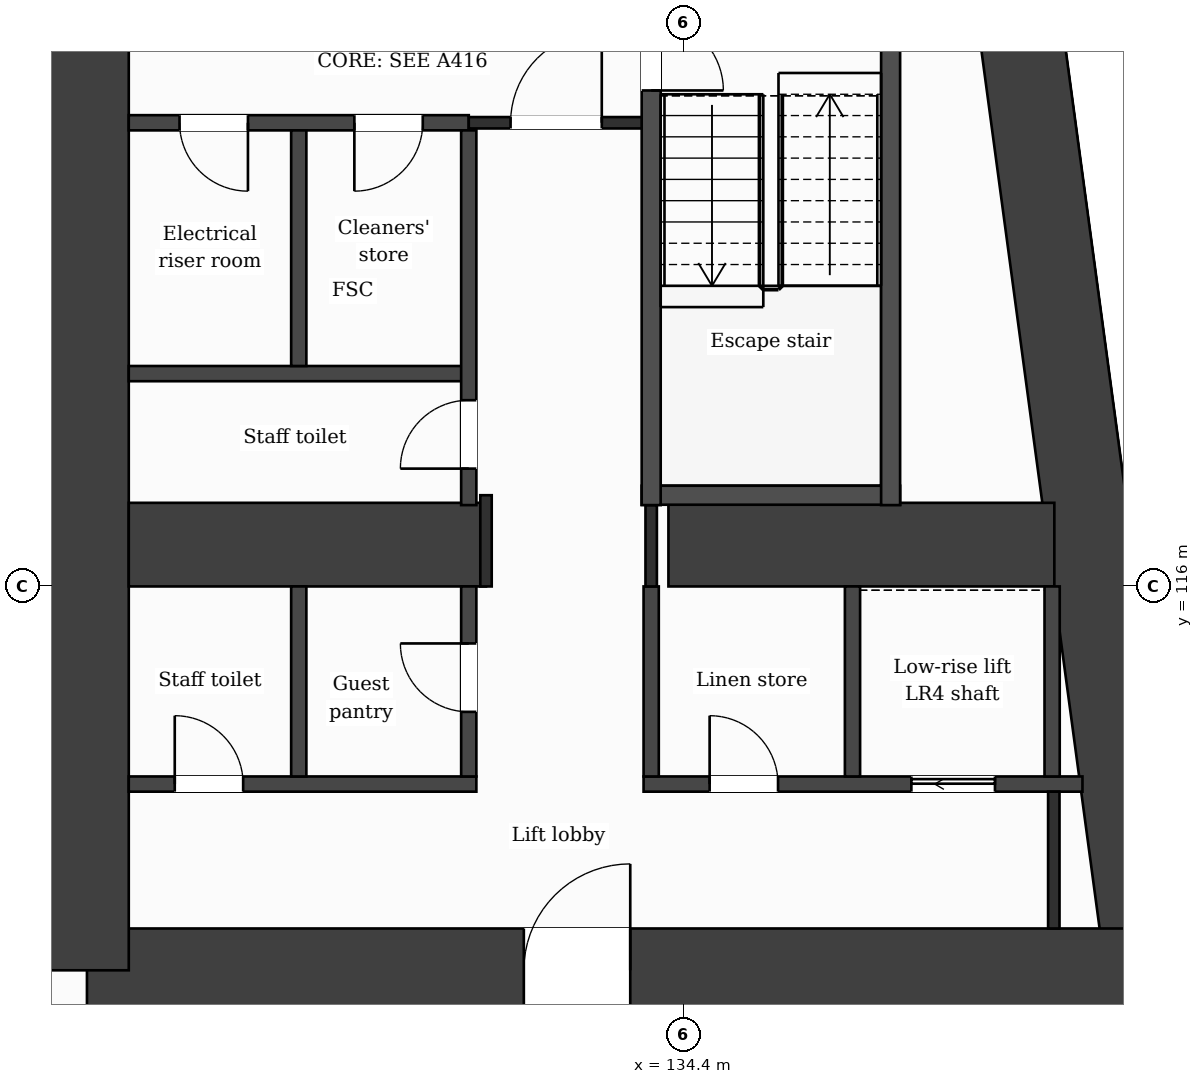
"""IFC4 building model, lengths in metres.
Left out: names, types, materials, properties, quantities, classifications, styles, units other than length and angle.
Written with IfcOpenShell. Run it as: python <this file> out.ifc"""

import sys

from ifc_helpers import new_model, si_unit, direction, frame, frame_2d, origin, place, context, subcontext, project, spatial, rectangle, extrude, element, fill, save


model = new_model("IFC4")
c1 = context("Model", 3, precision=1e-05, world=origin(), true_north=direction((0.0, 1.0)))
c2 = subcontext(c1, "Body", "Model", "MODEL_VIEW")
j1 = project(units=[si_unit("LENGTHUNIT", "METRE"), si_unit("PLANEANGLEUNIT", "RADIAN")], contexts=[c1])
p1 = place(None, origin())
s1 = spatial("IfcSite", under=j1, at=p1, CompositionType="ELEMENT")
p2 = place(p1, origin())
s2 = spatial("IfcBuilding", under=s1, at=p2, CompositionType="ELEMENT")
p3 = place(p2, frame((0.0, 0.0, 70.5)))
s3 = spatial("IfcBuildingStorey", under=s2, at=p3, CompositionType="ELEMENT", Elevation=70.5)
p4 = place(p3, frame((137.688, 131.85, 0.0), z_axis=(0.0, 0.0, 1.0), x_axis=(0.133411793472, -0.991060691059, 0.0)))
e1 = element("IfcWall", 1, at=p4, inside=s3, PredefinedType="SHEAR", context=c2, shape_type="SweptSolid", body=[
    extrude(rectangle(XDim=21.089, YDim=1.1, at=frame_2d((10.544, 0.0))), origin(), (0.0, 0.0, 1.0), 3.5),
])
p5 = place(p3, frame((140.502, 110.95, 0.0), z_axis=(0.0, 0.0, 1.0), x_axis=(-1.0, 0.0, 0.0)))
e2 = element("IfcWall", 2, at=p5, inside=s3, PredefinedType="SHEAR", context=c2, shape_type="SweptSolid", body=[
    extrude(rectangle(XDim=13.952, YDim=1.1, at=frame_2d((6.976, 0.0))), origin(), (0.0, 0.0, 1.0), 3.5),
])
p6 = place(p5, frame((6.804, 0.0, 0.0)))
e3 = element("IfcOpeningElement", 3, at=p6, cuts=e2, PredefinedType="OPENING", context=c2, shape_type="SweptSolid", body=[
    extrude(rectangle(XDim=1.4, YDim=2.1, at=frame_2d((0.7, 1.05))), frame((0.0, 0.56, 0.0), z_axis=(0.0, -1.0, 0.0), x_axis=(1.0, 0.0, 0.0)), (0.0, 0.0, 1.0), 1.12),
])
p7 = place(p3, frame((126.55, 110.95, 0.0), z_axis=(0.0, 0.0, 1.0), x_axis=(0.0, 1.0, 0.0)))
e4 = element("IfcWall", 4, at=p7, inside=s3, PredefinedType="SHEAR", context=c2, shape_type="SweptSolid", body=[
    extrude(rectangle(XDim=20.9, YDim=1.1, at=frame_2d((10.45, 0.0))), origin(), (0.0, 0.0, 1.0), 3.5),
])
p8 = place(p3, frame((127.1, 116.55, 0.0), z_axis=(0.0, 0.0, 1.0), x_axis=(1.0, 0.0, 0.0)))
e5 = element("IfcWall", 5, at=p8, inside=s3, PredefinedType="SHEAR", context=c2, shape_type="SweptSolid", body=[
    extrude(rectangle(XDim=4.7, YDim=1.1, at=frame_2d((2.35, 0.0))), origin(), (0.0, 0.0, 1.0), 3.5),
])
p9 = place(p3, frame((134.2, 116.55, 0.0), z_axis=(0.0, 0.0, 1.0), x_axis=(1.0, 0.0, 0.0)))
e6 = element("IfcWall", 6, at=p9, inside=s3, PredefinedType="SHEAR", context=c2, shape_type="SweptSolid", body=[
    extrude(rectangle(XDim=5.077, YDim=1.1, at=frame_2d((2.539, 0.0))), origin(), (0.0, 0.0, 1.0), 3.5),
])
p10 = place(p3, frame((127.1, 113.4, 0.0), z_axis=(0.0, 0.0, 1.0), x_axis=(1.0, 0.0, 0.0)))
e7 = element("IfcWall", 7, at=p10, inside=s3, PredefinedType="PARTITIONING", context=c2, shape_type="SweptSolid", body=[
    extrude(rectangle(XDim=4.573, YDim=0.2, at=frame_2d((2.287, 0.0))), origin(), (0.0, 0.0, 1.0), 3.18),
])
p11 = place(p10, frame((0.605, 0.0, 0.0)))
e8 = element("IfcOpeningElement", 8, at=p11, cuts=e7, PredefinedType="OPENING", context=c2, shape_type="SweptSolid", body=[
    extrude(rectangle(XDim=0.9, YDim=2.1, at=frame_2d((0.45, 1.05))), frame((0.0, 0.11, 0.0), z_axis=(0.0, -1.0, 0.0), x_axis=(1.0, 0.0, 0.0)), (0.0, 0.0, 1.0), 0.22),
])
p12 = place(p3, frame((133.873, 113.4, 0.0), z_axis=(0.0, 0.0, 1.0), x_axis=(1.0, 0.0, 0.0)))
e9 = element("IfcWall", 9, at=p12, inside=s3, PredefinedType="PARTITIONING", context=c2, shape_type="SweptSolid", body=[
    extrude(rectangle(XDim=5.774, YDim=0.2, at=frame_2d((2.887, 0.0))), origin(), (0.0, 0.0, 1.0), 3.18),
])
p13 = place(p12, frame((3.523, 0.0, 0.0)))
e10 = element("IfcOpeningElement", 10, at=p13, cuts=e9, PredefinedType="OPENING", context=c2, shape_type="SweptSolid", body=[
    extrude(rectangle(XDim=1.1, YDim=2.1, at=frame_2d((0.55, 1.05))), frame((0.0, 0.11, 0.0), z_axis=(0.0, -1.0, 0.0), x_axis=(1.0, 0.0, 0.0)), (0.0, 0.0, 1.0), 0.22),
])
p14 = place(p12, frame((0.869, 0.0, 0.0)))
e11 = element("IfcOpeningElement", 11, at=p14, cuts=e9, PredefinedType="OPENING", context=c2, shape_type="SweptSolid", body=[
    extrude(rectangle(XDim=0.9, YDim=2.1, at=frame_2d((0.45, 1.05))), frame((0.0, 0.11, 0.0), z_axis=(0.0, -1.0, 0.0), x_axis=(1.0, 0.0, 0.0)), (0.0, 0.0, 1.0), 0.22),
])
p15 = place(p3, frame((133.848, 117.2, 0.0), z_axis=(0.0, 0.0, 1.0), x_axis=(1.0, 0.0, 0.0)))
e12 = element("IfcWall", 12, at=p15, inside=s3, PredefinedType="PARTITIONING", context=c2, shape_type="SweptSolid", body=[
    extrude(rectangle(XDim=3.4, YDim=0.25, at=frame_2d((1.7, 0.0))), origin(), (0.0, 0.0, 1.0), 3.18),
])
p16 = place(p3, frame((127.1, 118.8, 0.0), z_axis=(0.0, 0.0, 1.0), x_axis=(1.0, 0.0, 0.0)))
e13 = element("IfcWall", 13, at=p16, inside=s3, PredefinedType="PARTITIONING", context=c2, shape_type="SweptSolid", body=[
    extrude(rectangle(XDim=4.473, YDim=0.2, at=frame_2d((2.236, 0.0))), origin(), (0.0, 0.0, 1.0), 3.18),
])
p17 = place(p3, frame((127.1, 122.1, 0.0), z_axis=(0.0, 0.0, 1.0), x_axis=(1.0, 0.0, 0.0)))
e14 = element("IfcWall", 14, at=p17, inside=s3, PredefinedType="PARTITIONING", context=c2, shape_type="SweptSolid", body=[
    extrude(rectangle(XDim=4.473, YDim=0.2, at=frame_2d((2.236, 0.0))), origin(), (0.0, 0.0, 1.0), 3.18),
])
p18 = place(p17, frame((2.968, 0.0, 0.0)))
e15 = element("IfcOpeningElement", 15, at=p18, cuts=e14, PredefinedType="OPENING", context=c2, shape_type="SweptSolid", body=[
    extrude(rectangle(XDim=0.9, YDim=2.1, at=frame_2d((0.45, 1.05))), frame((0.0, 0.11, 0.0), z_axis=(0.0, -1.0, 0.0), x_axis=(1.0, 0.0, 0.0)), (0.0, 0.0, 1.0), 0.22),
])
p19 = place(p17, frame((0.668, 0.0, 0.0)))
e16 = element("IfcOpeningElement", 16, at=p19, cuts=e14, PredefinedType="OPENING", context=c2, shape_type="SweptSolid", body=[
    extrude(rectangle(XDim=0.9, YDim=2.1, at=frame_2d((0.45, 1.05))), frame((0.0, 0.11, 0.0), z_axis=(0.0, -1.0, 0.0), x_axis=(1.0, 0.0, 0.0)), (0.0, 0.0, 1.0), 0.22),
])
p20 = place(p3, frame((131.573, 122.1, 0.0), z_axis=(0.0, 0.0, 1.0), x_axis=(1.0, 0.0, 0.0)))
e17 = element("IfcWall", 17, at=p20, inside=s3, PredefinedType="PARTITIONING", context=c2, shape_type="SweptSolid", body=[
    extrude(rectangle(XDim=2.4, YDim=0.15, at=frame_2d((1.2, 0.0))), origin(), (0.0, 0.0, 1.0), 3.18),
])
p21 = place(p20, frame((0.55, 0.0, 0.0)))
e18 = element("IfcOpeningElement", 18, at=p21, cuts=e17, PredefinedType="OPENING", context=c2, shape_type="SweptSolid", body=[
    extrude(rectangle(XDim=1.2, YDim=2.1, at=frame_2d((0.6, 1.05))), frame((0.0, 0.085, 0.0), z_axis=(0.0, -1.0, 0.0), x_axis=(1.0, 0.0, 0.0)), (0.0, 0.0, 1.0), 0.17),
])
p22 = place(p3, frame((129.336, 113.5, 0.0), z_axis=(0.0, 0.0, 1.0), x_axis=(0.0, 1.0, 0.0)))
e19 = element("IfcWall", 19, at=p22, inside=s3, PredefinedType="PARTITIONING", context=c2, shape_type="SweptSolid", body=[
    extrude(rectangle(XDim=2.5, YDim=0.2, at=frame_2d((1.25, 0.0))), origin(), (0.0, 0.0, 1.0), 3.18),
])
p23 = place(p3, frame((129.336, 118.9, 0.0), z_axis=(0.0, 0.0, 1.0), x_axis=(0.0, 1.0, 0.0)))
e20 = element("IfcWall", 20, at=p23, inside=s3, PredefinedType="PARTITIONING", context=c2, shape_type="SweptSolid", body=[
    extrude(rectangle(XDim=3.1, YDim=0.2, at=frame_2d((1.55, 0.0))), origin(), (0.0, 0.0, 1.0), 3.18),
])
p24 = place(p3, frame((131.573, 113.5, 0.0), z_axis=(0.0, 0.0, 1.0), x_axis=(0.0, 1.0, 0.0)))
e21 = element("IfcWall", 21, at=p24, inside=s3, PredefinedType="PARTITIONING", context=c2, shape_type="SweptSolid", body=[
    extrude(rectangle(XDim=2.5, YDim=0.2, at=frame_2d((1.25, 0.0))), origin(), (0.0, 0.0, 1.0), 3.18),
])
p25 = place(p24, frame((0.85, 0.0, 0.0)))
e22 = element("IfcOpeningElement", 22, at=p25, cuts=e21, PredefinedType="OPENING", context=c2, shape_type="SweptSolid", body=[
    extrude(rectangle(XDim=0.9, YDim=2.1, at=frame_2d((0.45, 1.05))), frame((0.0, 0.11, 0.0), z_axis=(0.0, -1.0, 0.0), x_axis=(1.0, 0.0, 0.0)), (0.0, 0.0, 1.0), 0.22),
])
p26 = place(p3, frame((131.573, 117.07, 0.0), z_axis=(0.0, 0.0, 1.0), x_axis=(0.0, 1.0, 0.0)))
e23 = element("IfcWall", 23, at=p26, inside=s3, PredefinedType="PARTITIONING", context=c2, shape_type="SweptSolid", body=[
    extrude(rectangle(XDim=4.93, YDim=0.2, at=frame_2d((2.465, 0.0))), origin(), (0.0, 0.0, 1.0), 3.18),
])
p27 = place(p26, frame((0.48, 0.0, 0.0)))
e24 = element("IfcOpeningElement", 24, at=p27, cuts=e23, PredefinedType="OPENING", context=c2, shape_type="SweptSolid", body=[
    extrude(rectangle(XDim=0.9, YDim=2.1, at=frame_2d((0.45, 1.05))), frame((0.0, 0.11, 0.0), z_axis=(0.0, -1.0, 0.0), x_axis=(1.0, 0.0, 0.0)), (0.0, 0.0, 1.0), 0.22),
])
p28 = place(p3, frame((131.8, 116.0, 0.0), z_axis=(0.0, 0.0, 1.0), x_axis=(0.0, 1.0, 0.0)))
e25 = element("IfcWall", 25, at=p28, inside=s3, PredefinedType="PARTITIONING", context=c2, shape_type="SweptSolid", body=[
    extrude(rectangle(XDim=1.2, YDim=0.15, at=frame_2d((0.6, 0.0))), origin(), (0.0, 0.0, 1.0), 3.18),
])
p29 = place(p3, frame((133.973, 113.5, 0.0), z_axis=(0.0, 0.0, 1.0), x_axis=(0.0, 1.0, 0.0)))
e26 = element("IfcWall", 26, at=p29, inside=s3, PredefinedType="PARTITIONING", context=c2, shape_type="SweptSolid", body=[
    extrude(rectangle(XDim=2.5, YDim=0.2, at=frame_2d((1.25, 0.0))), origin(), (0.0, 0.0, 1.0), 3.18),
])
p30 = place(p3, frame((133.973, 116.0, 0.0), z_axis=(0.0, 0.0, 1.0), x_axis=(0.0, 1.0, 0.0)))
e27 = element("IfcWall", 27, at=p30, inside=s3, PredefinedType="PARTITIONING", context=c2, shape_type="SweptSolid", body=[
    extrude(rectangle(XDim=1.07, YDim=0.15, at=frame_2d((0.535, 0.0))), origin(), (0.0, 0.0, 1.0), 3.18),
])
p31 = place(p3, frame((133.973, 117.07, 0.0), z_axis=(0.0, 0.0, 1.0), x_axis=(0.0, 1.0, 0.0)))
e28 = element("IfcWall", 28, at=p31, inside=s3, PredefinedType="PARTITIONING", context=c2, shape_type="SweptSolid", body=[
    extrude(rectangle(XDim=6.755, YDim=0.25, at=frame_2d((3.377, 0.0))), origin(), (0.0, 0.0, 1.0), 3.18),
])
p32 = place(p31, frame((5.455, 0.0, 0.0)))
e29 = element("IfcOpeningElement", 29, at=p32, cuts=e28, PredefinedType="OPENING", context=c2, shape_type="SweptSolid", body=[
    extrude(rectangle(XDim=0.95, YDim=2.1, at=frame_2d((0.475, 1.05))), frame((0.0, 0.135, 0.0), z_axis=(0.0, -1.0, 0.0), x_axis=(1.0, 0.0, 0.0)), (0.0, 0.0, 1.0), 0.27),
])
p33 = place(p3, frame((136.622, 113.5, 0.0), z_axis=(0.0, 0.0, 1.0), x_axis=(0.0, 1.0, 0.0)))
e30 = element("IfcWall", 30, at=p33, inside=s3, PredefinedType="PARTITIONING", context=c2, shape_type="SweptSolid", body=[
    extrude(rectangle(XDim=2.5, YDim=0.2, at=frame_2d((1.25, 0.0))), origin(), (0.0, 0.0, 1.0), 3.18),
])
p34 = place(p3, frame((137.123, 117.07, 0.0), z_axis=(0.0, 0.0, 1.0), x_axis=(0.0, 1.0, 0.0)))
e31 = element("IfcWall", 31, at=p34, inside=s3, PredefinedType="PARTITIONING", context=c2, shape_type="SweptSolid", body=[
    extrude(rectangle(XDim=6.755, YDim=0.25, at=frame_2d((3.377, 0.0))), origin(), (0.0, 0.0, 1.0), 3.18),
])
p35 = place(p3, frame((139.248, 113.5, 0.0), z_axis=(0.0, 0.0, 1.0), x_axis=(0.0, 1.0, 0.0)))
e32 = element("IfcWall", 32, at=p35, inside=s3, PredefinedType="PARTITIONING", context=c2, shape_type="SweptSolid", body=[
    extrude(rectangle(XDim=2.5, YDim=0.2, at=frame_2d((1.25, 0.0))), origin(), (0.0, 0.0, 1.0), 3.18),
])
p36 = place(p3, frame((139.27, 111.5, 0.0), z_axis=(0.0, 0.0, 1.0), x_axis=(0.0, 1.0, 0.0)))
e33 = element("IfcWall", 33, at=p36, inside=s3, PredefinedType="PARTITIONING", context=c2, shape_type="SweptSolid", body=[
    extrude(rectangle(XDim=1.8, YDim=0.15, at=frame_2d((0.9, 0.0))), origin(), (0.0, 0.0, 1.0), 3.18),
])
p37 = place(p21, origin())
e34 = element("IfcDoor", 34, at=p37, inside=s3, OperationType="SINGLE_SWING_RIGHT", PredefinedType="DOOR", context=c2, shape_type="SweptSolid", body=[
    extrude(rectangle(XDim=1.2, YDim=2.1, at=frame_2d((0.6, 1.05))), frame((0.0, 0.025, 0.0), z_axis=(0.0, -1.0, 0.0), x_axis=(1.0, 0.0, 0.0)), (0.0, 0.0, 1.0), 0.05),
])
fill(e18, e34)
p38 = place(p18, origin())
e35 = element("IfcDoor", 35, at=p38, inside=s3, OperationType="SINGLE_SWING_LEFT", PredefinedType="DOOR", context=c2, shape_type="SweptSolid", body=[
    extrude(rectangle(XDim=0.9, YDim=2.1, at=frame_2d((0.45, 1.05))), frame((0.0, 0.025, 0.0), z_axis=(0.0, -1.0, 0.0), x_axis=(1.0, 0.0, 0.0)), (0.0, 0.0, 1.0), 0.05),
])
fill(e15, e35)
p39 = place(p19, origin())
e36 = element("IfcDoor", 36, at=p39, inside=s3, OperationType="SINGLE_SWING_RIGHT", PredefinedType="DOOR", context=c2, shape_type="SweptSolid", body=[
    extrude(rectangle(XDim=0.9, YDim=2.1, at=frame_2d((0.45, 1.05))), frame((0.0, 0.025, 0.0), z_axis=(0.0, -1.0, 0.0), x_axis=(1.0, 0.0, 0.0)), (0.0, 0.0, 1.0), 0.05),
])
fill(e16, e36)
p40 = place(p32, origin())
e37 = element("IfcDoor", 37, at=p40, inside=s3, OperationType="SINGLE_SWING_LEFT", PredefinedType="DOOR", context=c2, shape_type="SweptSolid", body=[
    extrude(rectangle(XDim=0.95, YDim=2.1, at=frame_2d((0.475, 1.05))), frame((0.0, 0.025, 0.0), z_axis=(0.0, -1.0, 0.0), x_axis=(1.0, 0.0, 0.0)), (0.0, 0.0, 1.0), 0.05),
])
fill(e29, e37)
p41 = place(p27, origin())
e38 = element("IfcDoor", 38, at=p41, inside=s3, OperationType="SINGLE_SWING_LEFT", PredefinedType="DOOR", context=c2, shape_type="SweptSolid", body=[
    extrude(rectangle(XDim=0.9, YDim=2.1, at=frame_2d((0.45, 1.05))), frame((0.0, 0.025, 0.0), z_axis=(0.0, -1.0, 0.0), x_axis=(1.0, 0.0, 0.0)), (0.0, 0.0, 1.0), 0.05),
])
fill(e24, e38)
p42 = place(p13, origin())
e39 = element("IfcDoor", 39, at=p42, inside=s3, OperationType="SLIDING_TO_LEFT", PredefinedType="DOOR", context=c2, shape_type="SweptSolid", body=[
    extrude(rectangle(XDim=1.1, YDim=2.1, at=frame_2d((0.55, 1.05))), frame((0.0, 0.025, 0.0), z_axis=(0.0, -1.0, 0.0), x_axis=(1.0, 0.0, 0.0)), (0.0, 0.0, 1.0), 0.05),
])
fill(e10, e39)
p43 = place(p14, origin())
e40 = element("IfcDoor", 40, at=p43, inside=s3, OperationType="SINGLE_SWING_LEFT", PredefinedType="DOOR", context=c2, shape_type="SweptSolid", body=[
    extrude(rectangle(XDim=0.9, YDim=2.1, at=frame_2d((0.45, 1.05))), frame((0.0, 0.025, 0.0), z_axis=(0.0, -1.0, 0.0), x_axis=(1.0, 0.0, 0.0)), (0.0, 0.0, 1.0), 0.05),
])
fill(e11, e40)
p44 = place(p25, origin())
e41 = element("IfcDoor", 41, at=p44, inside=s3, OperationType="SINGLE_SWING_RIGHT", PredefinedType="DOOR", context=c2, shape_type="SweptSolid", body=[
    extrude(rectangle(XDim=0.9, YDim=2.1, at=frame_2d((0.45, 1.05))), frame((0.0, 0.025, 0.0), z_axis=(0.0, -1.0, 0.0), x_axis=(1.0, 0.0, 0.0)), (0.0, 0.0, 1.0), 0.05),
])
fill(e22, e41)
p45 = place(p11, origin())
e42 = element("IfcDoor", 42, at=p45, inside=s3, OperationType="SINGLE_SWING_LEFT", PredefinedType="DOOR", context=c2, shape_type="SweptSolid", body=[
    extrude(rectangle(XDim=0.9, YDim=2.1, at=frame_2d((0.45, 1.05))), frame((0.0, 0.025, 0.0), z_axis=(0.0, -1.0, 0.0), x_axis=(1.0, 0.0, 0.0)), (0.0, 0.0, 1.0), 0.05),
])
fill(e8, e42)
p46 = place(p6, origin())
e43 = element("IfcDoor", 43, at=p46, inside=s3, OperationType="SINGLE_SWING_LEFT", PredefinedType="DOOR", context=c2, shape_type="SweptSolid", body=[
    extrude(rectangle(XDim=1.4, YDim=2.1, at=frame_2d((0.7, 1.05))), frame((0.0, 0.025, 0.0), z_axis=(0.0, -1.0, 0.0), x_axis=(1.0, 0.0, 0.0)), (0.0, 0.0, 1.0), 0.05),
])
fill(e3, e43)
save(model, sys.argv[1])
